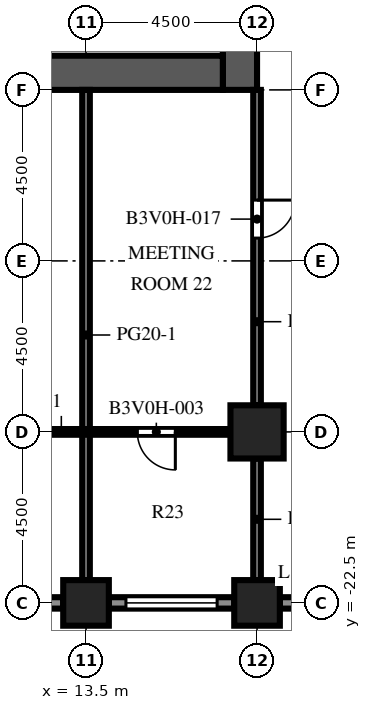
"""IFC4 building model, lengths in metres.
Left out: names, types, materials, properties, quantities, classifications, styles, units other than length and angle.
Written with IfcOpenShell. Run it as: python <this file> out.ifc"""

import sys

from ifc_helpers import new_model, si_unit, direction, frame, frame_2d, origin, origin_2d, place, context, subcontext, project, spatial, rectangle, extrude, element, fill, save


model = new_model("IFC4")
c1 = context("Model", 3, precision=1e-05, world=origin(), true_north=direction((0.0, 1.0)))
c2 = subcontext(c1, "Body", "Model", "MODEL_VIEW")
j1 = project(units=[si_unit("LENGTHUNIT", "METRE"), si_unit("PLANEANGLEUNIT", "RADIAN")], contexts=[c1])
p1 = place(None, origin())
s1 = spatial("IfcSite", under=j1, at=p1, CompositionType="ELEMENT")
p2 = place(p1, origin())
s2 = spatial("IfcBuilding", under=s1, at=p2, CompositionType="ELEMENT")
p3 = place(p2, frame((0.0, 0.0, 82.0)))
s3 = spatial("IfcBuildingStorey", under=s2, at=p3, CompositionType="ELEMENT", Elevation=82.0)
for number, where, z_axis, x_axis in (
    (1, (13.5, -22.5, 0.0), (0.0, 0.0, 1.0), (1.0, 0.0, 0.0)),
    (2, (18.0, -22.5, 0.0), (0.0, 0.0, 1.0), (1.0, 0.0, 0.0)),
):
    element("IfcColumn", number, at=place(p3, frame(where, z_axis=z_axis, x_axis=x_axis)), inside=s3, PredefinedType="COLUMN", context=c2, shape_type="SweptSolid", body=[
        extrude(rectangle(XDim=1.2, YDim=1.2, at=origin_2d()), origin(), (0.0, 0.0, 1.0), 4.1),
    ])
p4 = place(p3, frame((18.0, -18.0, 0.0), z_axis=(0.0, 0.0, 1.0), x_axis=(1.0, 0.0, 0.0)))
e3 = element("IfcColumn", 3, at=p4, inside=s3, PredefinedType="COLUMN", context=c2, shape_type="SweptSolid", body=[
    extrude(rectangle(XDim=1.4, YDim=1.4, at=origin_2d()), origin(), (0.0, 0.0, 1.0), 4.1),
])
p5 = place(p3, frame((17.55, -9.0, 0.0), z_axis=(0.0, 0.0, 1.0), x_axis=(0.0, 1.0, 0.0)))
e4 = element("IfcWall", 4, at=p5, inside=s3, PredefinedType="SHEAR", context=c2, shape_type="SweptSolid", body=[
    extrude(rectangle(XDim=27.5, YDim=0.9, at=frame_2d((13.75, 0.0))), origin(), (0.0, 0.0, 1.0), 4.1),
])
p6 = place(p5, frame((12.55, 0.0, 0.0)))
e5 = element("IfcOpeningElement", 5, at=p6, cuts=e4, PredefinedType="OPENING", context=c2, shape_type="SweptSolid", body=[
    extrude(rectangle(XDim=2.4, YDim=2.4, at=frame_2d((1.2, 1.2))), frame((0.0, 0.46, 0.0), z_axis=(0.0, -1.0, 0.0), x_axis=(1.0, 0.0, 0.0)), (0.0, 0.0, 1.0), 0.92),
])
p7 = place(p5, frame((6.825, 0.0, 0.0)))
e6 = element("IfcOpeningElement", 6, at=p7, cuts=e4, PredefinedType="OPENING", context=c2, shape_type="SweptSolid", body=[
    extrude(rectangle(XDim=1.2, YDim=2.1, at=frame_2d((0.6, 1.05))), frame((0.0, 0.46, 0.0), z_axis=(0.0, -1.0, 0.0), x_axis=(1.0, 0.0, 0.0)), (0.0, 0.0, 1.0), 0.92),
])
p8 = place(p5, frame((19.475, 0.0, 0.0)))
e7 = element("IfcOpeningElement", 7, at=p8, cuts=e4, PredefinedType="OPENING", context=c2, shape_type="SweptSolid", body=[
    extrude(rectangle(XDim=1.2, YDim=2.1, at=frame_2d((0.6, 1.05))), frame((0.0, 0.46, 0.0), z_axis=(0.0, -1.0, 0.0), x_axis=(1.0, 0.0, 0.0)), (0.0, 0.0, 1.0), 0.92),
])
p9 = place(p3, frame((6.9, -8.55, 0.0), z_axis=(0.0, 0.0, 1.0), x_axis=(1.0, 0.0, 0.0)))
e8 = element("IfcWall", 8, at=p9, inside=s3, PredefinedType="SHEAR", context=c2, shape_type="SweptSolid", body=[
    extrude(rectangle(XDim=10.2, YDim=0.9, at=frame_2d((5.1, 0.0))), origin(), (0.0, 0.0, 1.0), 4.1),
])
p10 = place(p3, frame((12.9, -22.5, 0.0), z_axis=(0.0, 0.0, 1.0), x_axis=(-1.0, 0.0, 0.0)))
e9 = element("IfcWall", 9, at=p10, inside=s3, PredefinedType="SOLIDWALL", context=c2, shape_type="SweptSolid", body=[
    extrude(rectangle(XDim=3.3, YDim=0.3, at=frame_2d((1.65, 0.0))), origin(), (0.0, 0.0, 1.0), 2.75),
])
p11 = place(p10, frame((0.45, 0.0, 0.8)))
e10 = element("IfcOpeningElement", 10, at=p11, cuts=e9, PredefinedType="OPENING", context=c2, shape_type="SweptSolid", body=[
    extrude(rectangle(XDim=2.4, YDim=1.7, at=frame_2d((1.2, 0.85))), frame((0.0, 0.16, 0.0), z_axis=(0.0, -1.0, 0.0), x_axis=(1.0, 0.0, 0.0)), (0.0, 0.0, 1.0), 0.32),
])
p12 = place(p3, frame((17.4, -22.5, 0.0), z_axis=(0.0, 0.0, 1.0), x_axis=(-1.0, 0.0, 0.0)))
e11 = element("IfcWall", 11, at=p12, inside=s3, PredefinedType="SOLIDWALL", context=c2, shape_type="SweptSolid", body=[
    extrude(rectangle(XDim=3.3, YDim=0.3, at=frame_2d((1.65, 0.0))), origin(), (0.0, 0.0, 1.0), 2.75),
])
p13 = place(p12, frame((0.45, 0.0, 0.8)))
e12 = element("IfcOpeningElement", 12, at=p13, cuts=e11, PredefinedType="OPENING", context=c2, shape_type="SweptSolid", body=[
    extrude(rectangle(XDim=2.4, YDim=1.7, at=frame_2d((1.2, 0.85))), frame((0.0, 0.16, 0.0), z_axis=(0.0, -1.0, 0.0), x_axis=(1.0, 0.0, 0.0)), (0.0, 0.0, 1.0), 0.32),
])
p14 = place(p3, frame((21.9, -22.5, 0.0), z_axis=(0.0, 0.0, 1.0), x_axis=(-1.0, 0.0, 0.0)))
e13 = element("IfcWall", 13, at=p14, inside=s3, PredefinedType="SOLIDWALL", context=c2, shape_type="SweptSolid", body=[
    extrude(rectangle(XDim=3.3, YDim=0.3, at=frame_2d((1.65, 0.0))), origin(), (0.0, 0.0, 1.0), 2.75),
])
p15 = place(p14, frame((1.15, 0.0, 0.0)))
e14 = element("IfcOpeningElement", 14, at=p15, cuts=e13, PredefinedType="OPENING", context=c2, shape_type="SweptSolid", body=[
    extrude(rectangle(XDim=1.0, YDim=2.2, at=frame_2d((0.5, 1.1))), frame((0.0, 0.16, 0.0), z_axis=(0.0, -1.0, 0.0), x_axis=(1.0, 0.0, 0.0)), (0.0, 0.0, 1.0), 0.32),
])
p16 = place(p3, frame((13.5, -21.9, 0.0), z_axis=(0.0, 0.0, 1.0), x_axis=(0.0, 1.0, 0.0)))
e15 = element("IfcWall", 15, at=p16, inside=s3, PredefinedType="PARTITIONING", context=c2, shape_type="SweptSolid", body=[
    extrude(rectangle(XDim=12.9, YDim=0.2, at=frame_2d((6.45, 0.0))), origin(), (0.0, 0.0, 1.0), 3.65),
])
p17 = place(p3, frame((18.0, -21.9, 0.0), z_axis=(0.0, 0.0, 1.0), x_axis=(0.0, 1.0, 0.0)))
e16 = element("IfcWall", 16, at=p17, inside=s3, PredefinedType="PARTITIONING", context=c2, shape_type="SweptSolid", body=[
    extrude(rectangle(XDim=3.2, YDim=0.2, at=frame_2d((1.6, 0.0))), origin(), (0.0, 0.0, 1.0), 3.65),
])
p18 = place(p3, frame((18.0, -17.3, 0.0), z_axis=(0.0, 0.0, 1.0), x_axis=(0.0, 1.0, 0.0)))
e17 = element("IfcWall", 17, at=p18, inside=s3, PredefinedType="PARTITIONING", context=c2, shape_type="SweptSolid", body=[
    extrude(rectangle(XDim=8.3, YDim=0.2, at=frame_2d((4.15, 0.0))), origin(), (0.0, 0.0, 1.0), 3.65),
])
p19 = place(p18, frame((4.4, 0.0, 0.0)))
e18 = element("IfcOpeningElement", 18, at=p19, cuts=e17, PredefinedType="OPENING", context=c2, shape_type="SweptSolid", body=[
    extrude(rectangle(XDim=1.0, YDim=2.1, at=frame_2d((0.5, 1.05))), frame((0.0, 0.11, 0.0), z_axis=(0.0, -1.0, 0.0), x_axis=(1.0, 0.0, 0.0)), (0.0, 0.0, 1.0), 0.22),
])
p20 = place(p3, frame((17.3, -18.0, 0.0), z_axis=(0.0, 0.0, 1.0), x_axis=(-1.0, 0.0, 0.0)))
e19 = element("IfcWall", 19, at=p20, inside=s3, PredefinedType="PARTITIONING", context=c2, shape_type="SweptSolid", body=[
    extrude(rectangle(XDim=7.6, YDim=0.15, at=frame_2d((3.8, 0.0))), origin(), (0.0, 0.0, 1.0), 3.65),
])
p21 = place(p20, frame((6.45, 0.0, 0.0)))
e20 = element("IfcOpeningElement", 20, at=p21, cuts=e19, PredefinedType="OPENING", context=c2, shape_type="SweptSolid", body=[
    extrude(rectangle(XDim=1.0, YDim=2.1, at=frame_2d((0.5, 1.05))), frame((0.0, 0.085, 0.0), z_axis=(0.0, -1.0, 0.0), x_axis=(1.0, 0.0, 0.0)), (0.0, 0.0, 1.0), 0.17),
])
p22 = place(p20, frame((1.45, 0.0, 0.0)))
e21 = element("IfcOpeningElement", 21, at=p22, cuts=e19, PredefinedType="OPENING", context=c2, shape_type="SweptSolid", body=[
    extrude(rectangle(XDim=1.0, YDim=2.1, at=frame_2d((0.5, 1.05))), frame((0.0, 0.085, 0.0), z_axis=(0.0, -1.0, 0.0), x_axis=(1.0, 0.0, 0.0)), (0.0, 0.0, 1.0), 0.17),
])
p23 = place(p13, origin())
e22 = element("IfcWindow", 22, at=p23, inside=s3, PartitioningType="SINGLE_PANEL", PredefinedType="WINDOW", context=c2, shape_type="SweptSolid", body=[
    extrude(rectangle(XDim=2.4, YDim=1.7, at=frame_2d((1.2, 0.85))), frame((0.0, 0.03, 0.0), z_axis=(0.0, -1.0, 0.0), x_axis=(1.0, 0.0, 0.0)), (0.0, 0.0, 1.0), 0.06),
])
fill(e12, e22)
p24 = place(p22, origin())
e23 = element("IfcDoor", 23, at=p24, inside=s3, OperationType="SINGLE_SWING_LEFT", PredefinedType="DOOR", context=c2, shape_type="SweptSolid", body=[
    extrude(rectangle(XDim=1.0, YDim=2.1, at=frame_2d((0.5, 1.05))), frame((0.0, 0.025, 0.0), z_axis=(0.0, -1.0, 0.0), x_axis=(1.0, 0.0, 0.0)), (0.0, 0.0, 1.0), 0.05),
])
fill(e21, e23)
p25 = place(p19, origin())
e24 = element("IfcDoor", 24, at=p25, inside=s3, OperationType="SINGLE_SWING_RIGHT", PredefinedType="DOOR", context=c2, shape_type="SweptSolid", body=[
    extrude(rectangle(XDim=1.0, YDim=2.1, at=frame_2d((0.5, 1.05))), frame((0.0, 0.025, 0.0), z_axis=(0.0, -1.0, 0.0), x_axis=(1.0, 0.0, 0.0)), (0.0, 0.0, 1.0), 0.05),
])
fill(e18, e24)
save(model, sys.argv[1])
